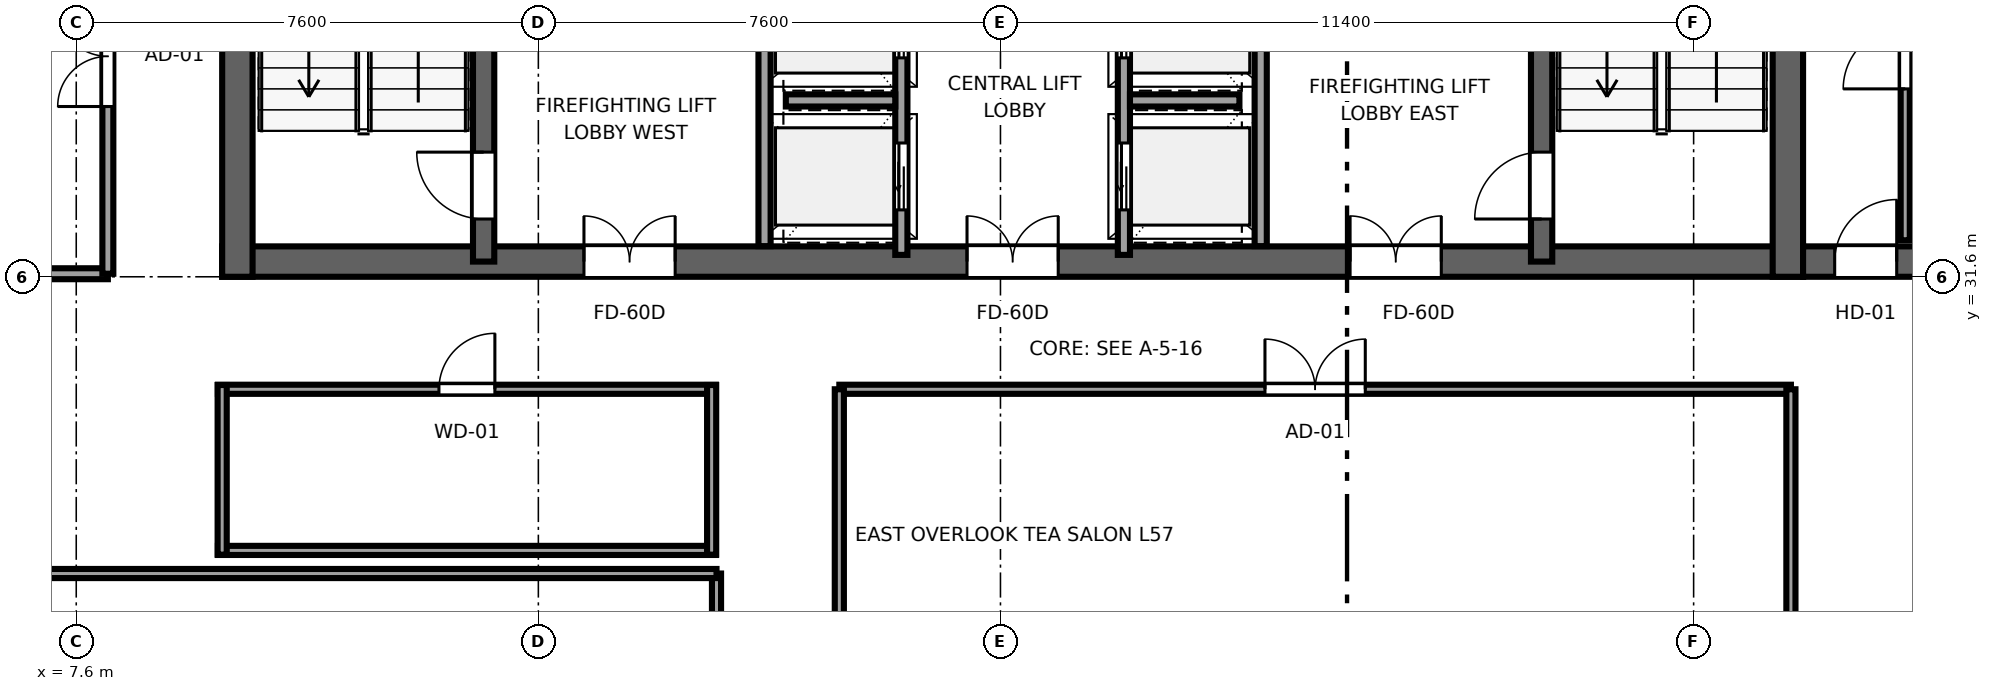
"""IFC4 building model, lengths in metres.
Left out: names, types, materials, properties, quantities, classifications, styles, units other than length and angle.
Written with IfcOpenShell. Run it as: python <this file> out.ifc"""

import sys

from ifc_helpers import new_model, si_unit, direction, frame, frame_2d, origin, place, context, subcontext, project, spatial, rectangle, extrude, source, transform, mapped, element, fill, save


model = new_model("IFC4")
c1 = context("Model", 3, precision=1e-05, world=origin(), true_north=direction((0.0, 1.0)))
c2 = subcontext(c1, "Body", "Model", "MODEL_VIEW")
j1 = project(units=[si_unit("LENGTHUNIT", "METRE"), si_unit("PLANEANGLEUNIT", "RADIAN")], contexts=[c1])
p1 = place(None, origin())
s1 = spatial("IfcSite", under=j1, at=p1, CompositionType="ELEMENT")
p2 = place(p1, origin())
s2 = spatial("IfcBuilding", under=s1, at=p2, CompositionType="ELEMENT")
p3 = place(p2, frame((0.0, 0.0, 216.8)))
s3 = spatial("IfcBuildingStorey", under=s2, at=p3, CompositionType="ELEMENT", Elevation=216.8)
p4 = place(p3, frame((10.0, 31.85, 0.0), z_axis=(0.0, 0.0, 1.0), x_axis=(1.0, 0.0, 0.0)))
e1 = element("IfcWall", 1, at=p4, inside=s3, PredefinedType="SHEAR", context=c2, shape_type="SweptSolid", body=[
    extrude(rectangle(XDim=26.0, YDim=0.5, at=frame_2d((13.0, 0.0))), origin(), (0.0, 0.0, 1.0), 3.55),
])
p5 = place(p4, frame((7.45, 0.0, 0.0), z_axis=(0.0, 0.0, 1.0), x_axis=(-1.0, 0.0, 0.0)))
e2 = element("IfcOpeningElement", 2, at=p5, cuts=e1, PredefinedType="OPENING", context=c2, shape_type="SweptSolid", body=[
    extrude(rectangle(XDim=1.5, YDim=2.04, at=frame_2d((0.75, 1.02))), frame((0.0, 0.26, 0.0), z_axis=(0.0, -1.0, 0.0), x_axis=(1.0, 0.0, 0.0)), (0.0, 0.0, 1.0), 0.52),
])
p6 = place(p4, frame((13.75, 0.0, 0.0), z_axis=(0.0, 0.0, 1.0), x_axis=(-1.0, 0.0, 0.0)))
e3 = element("IfcOpeningElement", 3, at=p6, cuts=e1, PredefinedType="OPENING", context=c2, shape_type="SweptSolid", body=[
    extrude(rectangle(XDim=1.5, YDim=2.04, at=frame_2d((0.75, 1.02))), frame((0.0, 0.26, 0.0), z_axis=(0.0, -1.0, 0.0), x_axis=(1.0, 0.0, 0.0)), (0.0, 0.0, 1.0), 0.52),
])
p7 = place(p4, frame((20.05, 0.0, 0.0), z_axis=(0.0, 0.0, 1.0), x_axis=(-1.0, 0.0, 0.0)))
e4 = element("IfcOpeningElement", 4, at=p7, cuts=e1, PredefinedType="OPENING", context=c2, shape_type="SweptSolid", body=[
    extrude(rectangle(XDim=1.5, YDim=2.04, at=frame_2d((0.75, 1.02))), frame((0.0, 0.26, 0.0), z_axis=(0.0, -1.0, 0.0), x_axis=(1.0, 0.0, 0.0)), (0.0, 0.0, 1.0), 0.52),
])
for number, where, z_axis, x_axis in (
    (5, (10.25, 31.6, 0.0), (0.0, 0.0, 1.0), (0.0, 1.0, 0.0)),
    (6, (35.75, 31.6, 0.0), (0.0, 0.0, 1.0), (0.0, 1.0, 0.0)),
):
    element("IfcWall", number, at=place(p3, frame(where, z_axis=z_axis, x_axis=x_axis)), inside=s3, PredefinedType="SHEAR", context=c2, shape_type="SweptSolid", body=[
        extrude(rectangle(XDim=13.6, YDim=0.5, at=frame_2d((6.8, 0.0))), origin(), (0.0, 0.0, 1.0), 3.55),
    ])
p8 = place(p3, frame((14.3, 31.85, 0.0), z_axis=(0.0, 0.0, 1.0), x_axis=(0.0, 1.0, 0.0)))
e7 = element("IfcWall", 7, at=p8, inside=s3, PredefinedType="SHEAR", context=c2, shape_type="SweptSolid", body=[
    extrude(rectangle(XDim=13.1, YDim=0.35, at=frame_2d((6.55, 0.0))), origin(), (0.0, 0.0, 1.0), 3.55),
])
p9 = place(p8, frame((0.7, 0.0, 0.0)))
e8 = element("IfcOpeningElement", 8, at=p9, cuts=e7, PredefinedType="OPENING", context=c2, shape_type="SweptSolid", body=[
    extrude(rectangle(XDim=1.1, YDim=2.12, at=frame_2d((0.55, 1.06))), frame((0.0, 0.185, 0.0), z_axis=(0.0, -1.0, 0.0), x_axis=(1.0, 0.0, 0.0)), (0.0, 0.0, 1.0), 0.37),
])
p10 = place(p3, frame((31.7, 31.85, 0.0), z_axis=(0.0, 0.0, 1.0), x_axis=(0.0, 1.0, 0.0)))
e9 = element("IfcWall", 9, at=p10, inside=s3, PredefinedType="SHEAR", context=c2, shape_type="SweptSolid", body=[
    extrude(rectangle(XDim=13.1, YDim=0.35, at=frame_2d((6.55, 0.0))), origin(), (0.0, 0.0, 1.0), 3.55),
])
p11 = place(p10, frame((1.8, 0.0, 0.0), z_axis=(0.0, 0.0, 1.0), x_axis=(-1.0, 0.0, 0.0)))
e10 = element("IfcOpeningElement", 10, at=p11, cuts=e9, PredefinedType="OPENING", context=c2, shape_type="SweptSolid", body=[
    extrude(rectangle(XDim=1.1, YDim=2.12, at=frame_2d((0.55, 1.06))), frame((0.0, 0.185, 0.0), z_axis=(0.0, -1.0, 0.0), x_axis=(1.0, 0.0, 0.0)), (0.0, 0.0, 1.0), 0.37),
])
p12 = place(p3, frame((36.0, 31.85, 0.0), z_axis=(0.0, 0.0, 1.0), x_axis=(1.0, 0.0, 0.0)))
e11 = element("IfcWall", 11, at=p12, inside=s3, PredefinedType="SHEAR", context=c2, shape_type="SweptSolid", body=[
    extrude(rectangle(XDim=3.8, YDim=0.5, at=frame_2d((1.9, 0.0))), origin(), (0.0, 0.0, 1.0), 3.55),
])
p13 = place(p12, frame((1.54, 0.0, 0.0), z_axis=(0.0, 0.0, 1.0), x_axis=(-1.0, 0.0, 0.0)))
e12 = element("IfcOpeningElement", 12, at=p13, cuts=e11, PredefinedType="OPENING", context=c2, shape_type="SweptSolid", body=[
    extrude(rectangle(XDim=1.02, YDim=2.03, at=frame_2d((0.51, 1.015))), frame((0.0, 0.26, 0.0), z_axis=(0.0, -1.0, 0.0), x_axis=(1.0, 0.0, 0.0)), (0.0, 0.0, 1.0), 0.52),
])
for number, where, z_axis, x_axis in (
    (13, (18.92, 32.104, 0.0), (0.0, 0.0, 1.0), (0.0, 1.0, 0.0)),
    (14, (27.08, 32.104, 0.0), (0.0, 0.0, 1.0), (0.0, 1.0, 0.0)),
):
    element("IfcWall", number, at=place(p3, frame(where, z_axis=z_axis, x_axis=x_axis)), inside=s3, PredefinedType="SOLIDWALL", context=c2, shape_type="SweptSolid", body=[
        extrude(rectangle(XDim=4.046, YDim=0.2, at=frame_2d((2.023, 0.0))), origin(), (0.0, 0.0, 1.0), 3.37),
    ])
p14 = place(p3, frame((21.17, 31.96, 0.0), z_axis=(0.0, 0.0, 1.0), x_axis=(0.0, 1.0, 0.0)))
e15 = element("IfcWall", 15, at=p14, inside=s3, PredefinedType="SOLIDWALL", context=c2, shape_type="SweptSolid", body=[
    extrude(rectangle(XDim=5.08, YDim=0.2, at=frame_2d((2.54, 0.0))), origin(), (0.0, 0.0, 1.0), 3.37),
])
p15 = place(p14, frame((0.74, 0.0, 0.0)))
e16 = element("IfcOpeningElement", 16, at=p15, cuts=e15, PredefinedType="OPENING", context=c2, shape_type="SweptSolid", body=[
    extrude(rectangle(XDim=1.1, YDim=2.12, at=frame_2d((0.55, 1.06))), frame((0.0, 0.11, 0.0), z_axis=(0.0, -1.0, 0.0), x_axis=(1.0, 0.0, 0.0)), (0.0, 0.0, 1.0), 0.22),
])
p16 = place(p14, frame((3.24, 0.0, 0.0)))
e17 = element("IfcOpeningElement", 17, at=p16, cuts=e15, PredefinedType="OPENING", context=c2, shape_type="SweptSolid", body=[
    extrude(rectangle(XDim=1.1, YDim=2.12, at=frame_2d((0.55, 1.06))), frame((0.0, 0.11, 0.0), z_axis=(0.0, -1.0, 0.0), x_axis=(1.0, 0.0, 0.0)), (0.0, 0.0, 1.0), 0.22),
])
p17 = place(p3, frame((19.27, 34.5, 0.0), z_axis=(0.0, 0.0, 1.0), x_axis=(1.0, 0.0, 0.0)))
e18 = element("IfcWall", 18, at=p17, inside=s3, PredefinedType="SOLIDWALL", context=c2, shape_type="SweptSolid", body=[
    extrude(rectangle(XDim=1.8, YDim=0.2, at=frame_2d((0.9, 0.0))), origin(), (0.0, 0.0, 1.0), 3.37),
])
p18 = place(p3, frame((24.83, 31.96, 0.0), z_axis=(0.0, 0.0, 1.0), x_axis=(0.0, 1.0, 0.0)))
e19 = element("IfcWall", 19, at=p18, inside=s3, PredefinedType="SOLIDWALL", context=c2, shape_type="SweptSolid", body=[
    extrude(rectangle(XDim=5.08, YDim=0.2, at=frame_2d((2.54, 0.0))), origin(), (0.0, 0.0, 1.0), 3.37),
])
p19 = place(p18, frame((0.74, 0.0, 0.0)))
e20 = element("IfcOpeningElement", 20, at=p19, cuts=e19, PredefinedType="OPENING", context=c2, shape_type="SweptSolid", body=[
    extrude(rectangle(XDim=1.1, YDim=2.12, at=frame_2d((0.55, 1.06))), frame((0.0, 0.11, 0.0), z_axis=(0.0, -1.0, 0.0), x_axis=(1.0, 0.0, 0.0)), (0.0, 0.0, 1.0), 0.22),
])
p20 = place(p18, frame((3.24, 0.0, 0.0)))
e21 = element("IfcOpeningElement", 21, at=p20, cuts=e19, PredefinedType="OPENING", context=c2, shape_type="SweptSolid", body=[
    extrude(rectangle(XDim=1.1, YDim=2.12, at=frame_2d((0.55, 1.06))), frame((0.0, 0.11, 0.0), z_axis=(0.0, -1.0, 0.0), x_axis=(1.0, 0.0, 0.0)), (0.0, 0.0, 1.0), 0.22),
])
p21 = place(p3, frame((24.93, 34.5, 0.0), z_axis=(0.0, 0.0, 1.0), x_axis=(1.0, 0.0, 0.0)))
e22 = element("IfcWall", 22, at=p21, inside=s3, PredefinedType="SOLIDWALL", context=c2, shape_type="SweptSolid", body=[
    extrude(rectangle(XDim=1.8, YDim=0.2, at=frame_2d((0.9, 0.0))), origin(), (0.0, 0.0, 1.0), 3.37),
])
p22 = place(p3, frame((37.68, 32.2, 0.0), z_axis=(0.0, 0.0, 1.0), x_axis=(0.0, 1.0, 0.0)))
e23 = element("IfcWall", 23, at=p22, inside=s3, PredefinedType="PARTITIONING", context=c2, shape_type="SweptSolid", body=[
    extrude(rectangle(XDim=6.0, YDim=0.15, at=frame_2d((3.0, 0.0))), origin(), (0.0, 0.0, 1.0), 3.37),
])
p23 = place(p22, frame((2.49, 0.0, 0.0)))
e24 = element("IfcOpeningElement", 24, at=p23, cuts=e23, PredefinedType="OPENING", context=c2, shape_type="SweptSolid", body=[
    extrude(rectangle(XDim=1.02, YDim=2.03, at=frame_2d((0.51, 1.015))), frame((0.0, 0.085, 0.0), z_axis=(0.0, -1.0, 0.0), x_axis=(1.0, 0.0, 0.0)), (0.0, 0.0, 1.0), 0.17),
])
p24 = place(p3, frame((18.13, 23.613, 0.0), z_axis=(0.0, 0.0, 1.0), x_axis=(0.0, 1.0, 0.0)))
e25 = element("IfcWall", 25, at=p24, inside=s3, PredefinedType="PARTITIONING", context=c2, shape_type="SweptSolid", body=[
    extrude(rectangle(XDim=3.107, YDim=0.15, at=frame_2d((1.553, 0.0))), origin(), (0.0, 0.0, 1.0), 3.37),
])
p25 = place(p24, frame((0.924, 0.0, 0.0)))
e26 = element("IfcOpeningElement", 26, at=p25, cuts=e25, PredefinedType="OPENING", context=c2, shape_type="SweptSolid", body=[
    extrude(rectangle(XDim=1.22, YDim=2.08, at=frame_2d((0.61, 1.04))), frame((0.0, 0.085, 0.0), z_axis=(0.0, -1.0, 0.0), x_axis=(1.0, 0.0, 0.0)), (0.0, 0.0, 1.0), 0.17),
])
p26 = place(p3, frame((3.005, 26.72, 0.0), z_axis=(0.0, 0.0, 1.0), x_axis=(1.0, 0.0, 0.0)))
e27 = element("IfcWall", 27, at=p26, inside=s3, PredefinedType="PARTITIONING", context=c2, shape_type="SweptSolid", body=[
    extrude(rectangle(XDim=15.125, YDim=0.15, at=frame_2d((7.562, 0.0))), origin(), (0.0, 0.0, 1.0), 3.37),
])
p27 = place(p3, frame((3.005, 31.65, 0.0), z_axis=(0.0, 0.0, 1.0), x_axis=(1.0, 0.0, 0.0)))
e28 = element("IfcWall", 28, at=p27, inside=s3, PredefinedType="PARTITIONING", context=c2, shape_type="SweptSolid", body=[
    extrude(rectangle(XDim=5.115, YDim=0.18, at=frame_2d((2.558, 0.0))), origin(), (0.0, 0.0, 1.0), 3.37),
])
p28 = place(p3, frame((8.12, 31.65, 0.0), z_axis=(0.0, 0.0, 1.0), x_axis=(0.0, 1.0, 0.0)))
e29 = element("IfcWall", 29, at=p28, inside=s3, PredefinedType="PARTITIONING", context=c2, shape_type="SweptSolid", body=[
    extrude(rectangle(XDim=6.55, YDim=0.18, at=frame_2d((3.275, 0.0))), origin(), (0.0, 0.0, 1.0), 3.37),
])
p29 = place(p28, frame((2.75, 0.0, 0.0)))
e30 = element("IfcOpeningElement", 30, at=p29, cuts=e29, PredefinedType="OPENING", context=c2, shape_type="SweptSolid", body=[
    extrude(rectangle(XDim=1.65, YDim=2.15, at=frame_2d((0.825, 1.075))), frame((0.0, 0.1, 0.0), z_axis=(0.0, -1.0, 0.0), x_axis=(1.0, 0.0, 0.0)), (0.0, 0.0, 1.0), 0.2),
])
p30 = place(p3, frame((9.93, 27.1, 0.0), z_axis=(0.0, 0.0, 1.0), x_axis=(1.0, 0.0, 0.0)))
e31 = element("IfcWall", 31, at=p30, inside=s3, PredefinedType="PARTITIONING", context=c2, shape_type="SweptSolid", body=[
    extrude(rectangle(XDim=8.19, YDim=0.15, at=frame_2d((4.095, 0.0))), origin(), (0.0, 0.0, 1.0), 3.37),
])
p31 = place(p3, frame((9.93, 29.75, 0.0), z_axis=(0.0, 0.0, 1.0), x_axis=(1.0, 0.0, 0.0)))
e32 = element("IfcWall", 32, at=p31, inside=s3, PredefinedType="PARTITIONING", context=c2, shape_type="SweptSolid", body=[
    extrude(rectangle(XDim=8.19, YDim=0.15, at=frame_2d((4.095, 0.0))), origin(), (0.0, 0.0, 1.0), 3.37),
])
p32 = place(p31, frame((3.635, 0.0, 0.0)))
e33 = element("IfcOpeningElement", 33, at=p32, cuts=e32, PredefinedType="OPENING", context=c2, shape_type="SweptSolid", body=[
    extrude(rectangle(XDim=0.92, YDim=2.01, at=frame_2d((0.46, 1.005))), frame((0.0, 0.085, 0.0), z_axis=(0.0, -1.0, 0.0), x_axis=(1.0, 0.0, 0.0)), (0.0, 0.0, 1.0), 0.17),
])
for number, where, z_axis, x_axis in (
    (34, (10.0, 27.03, 0.0), (0.0, 0.0, 1.0), (0.0, 1.0, 0.0)),
    (35, (18.05, 27.03, 0.0), (0.0, 0.0, 1.0), (0.0, 1.0, 0.0)),
):
    element("IfcWall", number, at=place(p3, frame(where, z_axis=z_axis, x_axis=x_axis)), inside=s3, PredefinedType="PARTITIONING", context=c2, shape_type="SweptSolid", body=[
        extrude(rectangle(XDim=2.79, YDim=0.15, at=frame_2d((1.395, 0.0))), origin(), (0.0, 0.0, 1.0), 3.37),
    ])
p33 = place(p3, frame((20.15, 29.75, 0.0), z_axis=(0.0, 0.0, 1.0), x_axis=(1.0, 0.0, 0.0)))
e36 = element("IfcWall", 36, at=p33, inside=s3, PredefinedType="PARTITIONING", context=c2, shape_type="SweptSolid", body=[
    extrude(rectangle(XDim=15.65, YDim=0.15, at=frame_2d((7.825, 0.0))), origin(), (0.0, 0.0, 1.0), 3.37),
])
p34 = place(p33, frame((7.0, 0.0, 0.0)))
e37 = element("IfcOpeningElement", 37, at=p34, cuts=e36, PredefinedType="OPENING", context=c2, shape_type="SweptSolid", body=[
    extrude(rectangle(XDim=1.65, YDim=2.15, at=frame_2d((0.825, 1.075))), frame((0.0, 0.085, 0.0), z_axis=(0.0, -1.0, 0.0), x_axis=(1.0, 0.0, 0.0)), (0.0, 0.0, 1.0), 0.17),
])
for number, where, z_axis, x_axis in (
    (38, (20.15, 25.0, 0.0), (0.0, 0.0, 1.0), (0.0, 1.0, 0.0)),
    (39, (35.8, 25.0, 0.0), (0.0, 0.0, 1.0), (0.0, 1.0, 0.0)),
):
    element("IfcWall", number, at=place(p3, frame(where, z_axis=z_axis, x_axis=x_axis)), inside=s3, PredefinedType="PARTITIONING", context=c2, shape_type="SweptSolid", body=[
        extrude(rectangle(XDim=4.75, YDim=0.15, at=frame_2d((2.375, 0.0))), origin(), (0.0, 0.0, 1.0), 3.37),
    ])
m1 = source(origin(), c2, "Body", "SweptSolid", [
    extrude(rectangle(XDim=1.1, YDim=2.12, at=frame_2d((0.55, 1.06))), frame((0.0, 0.025, 0.0), z_axis=(0.0, -1.0, 0.0), x_axis=(1.0, 0.0, 0.0)), (0.0, 0.0, 1.0), 0.05),
])
p35 = place(p9, origin())
e40 = element("IfcDoor", 40, at=p35, inside=s3, OperationType="SINGLE_SWING_RIGHT", PredefinedType="DOOR", context=c2, shape_type="MappedRepresentation", body=[
    mapped(m1, transform((0.0, 0.0, 0.0), x_axis=(1.0, 0.0, 0.0), y_axis=(0.0, 1.0, 0.0), z_axis=(0.0, 0.0, 1.0), scale=1.0)),
])
fill(e8, e40)
p36 = place(p11, origin())
e41 = element("IfcDoor", 41, at=p36, inside=s3, OperationType="SINGLE_SWING_LEFT", PredefinedType="DOOR", context=c2, shape_type="MappedRepresentation", body=[
    mapped(m1, transform((0.0, 0.0, 0.0), x_axis=(1.0, 0.0, 0.0), y_axis=(0.0, 1.0, 0.0), z_axis=(0.0, 0.0, 1.0), scale=1.0)),
])
fill(e10, e41)
m2 = source(origin(), c2, "Body", "SweptSolid", [
    extrude(rectangle(XDim=1.5, YDim=2.04, at=frame_2d((0.75, 1.02))), frame((0.0, 0.025, 0.0), z_axis=(0.0, -1.0, 0.0), x_axis=(1.0, 0.0, 0.0)), (0.0, 0.0, 1.0), 0.05),
])
p37 = place(p5, origin())
e42 = element("IfcDoor", 42, at=p37, inside=s3, OperationType="DOUBLE_DOOR_SINGLE_SWING", PredefinedType="DOOR", context=c2, shape_type="MappedRepresentation", body=[
    mapped(m2, transform((0.0, 0.0, 0.0), x_axis=(1.0, 0.0, 0.0), y_axis=(0.0, 1.0, 0.0), z_axis=(0.0, 0.0, 1.0), scale=1.0)),
])
fill(e2, e42)
p38 = place(p6, origin())
e43 = element("IfcDoor", 43, at=p38, inside=s3, OperationType="DOUBLE_DOOR_SINGLE_SWING", PredefinedType="DOOR", context=c2, shape_type="MappedRepresentation", body=[
    mapped(m2, transform((0.0, 0.0, 0.0), x_axis=(1.0, 0.0, 0.0), y_axis=(0.0, 1.0, 0.0), z_axis=(0.0, 0.0, 1.0), scale=1.0)),
])
fill(e3, e43)
p39 = place(p7, origin())
e44 = element("IfcDoor", 44, at=p39, inside=s3, OperationType="DOUBLE_DOOR_SINGLE_SWING", PredefinedType="DOOR", context=c2, shape_type="MappedRepresentation", body=[
    mapped(m2, transform((0.0, 0.0, 0.0), x_axis=(1.0, 0.0, 0.0), y_axis=(0.0, 1.0, 0.0), z_axis=(0.0, 0.0, 1.0), scale=1.0)),
])
fill(e4, e44)
m3 = source(origin(), c2, "Body", "SweptSolid", [
    extrude(rectangle(XDim=1.02, YDim=2.03, at=frame_2d((0.51, 1.015))), frame((0.0, 0.025, 0.0), z_axis=(0.0, -1.0, 0.0), x_axis=(1.0, 0.0, 0.0)), (0.0, 0.0, 1.0), 0.05),
])
p40 = place(p13, origin())
e45 = element("IfcDoor", 45, at=p40, inside=s3, OperationType="SINGLE_SWING_RIGHT", PredefinedType="DOOR", context=c2, shape_type="MappedRepresentation", body=[
    mapped(m3, transform((0.0, 0.0, 0.0), x_axis=(1.0, 0.0, 0.0), y_axis=(0.0, 1.0, 0.0), z_axis=(0.0, 0.0, 1.0), scale=1.0)),
])
fill(e12, e45)
m4 = source(origin(), c2, "Body", "SweptSolid", [
    extrude(rectangle(XDim=1.1, YDim=2.12, at=frame_2d((0.55, 1.06))), frame((0.0, 0.025, 0.0), z_axis=(0.0, -1.0, 0.0), x_axis=(1.0, 0.0, 0.0)), (0.0, 0.0, 1.0), 0.05),
])
p41 = place(p15, origin())
e46 = element("IfcDoor", 46, at=p41, inside=s3, OperationType="SLIDING_TO_LEFT", PredefinedType="DOOR", context=c2, shape_type="MappedRepresentation", body=[
    mapped(m4, transform((0.0, 0.0, 0.0), x_axis=(1.0, 0.0, 0.0), y_axis=(0.0, 1.0, 0.0), z_axis=(0.0, 0.0, 1.0), scale=1.0)),
])
fill(e16, e46)
p42 = place(p16, origin())
e47 = element("IfcDoor", 47, at=p42, inside=s3, OperationType="SLIDING_TO_RIGHT", PredefinedType="DOOR", context=c2, shape_type="MappedRepresentation", body=[
    mapped(m4, transform((0.0, 0.0, 0.0), x_axis=(1.0, 0.0, 0.0), y_axis=(0.0, 1.0, 0.0), z_axis=(0.0, 0.0, 1.0), scale=1.0)),
])
fill(e17, e47)
p43 = place(p19, origin())
e48 = element("IfcDoor", 48, at=p43, inside=s3, OperationType="SLIDING_TO_LEFT", PredefinedType="DOOR", context=c2, shape_type="MappedRepresentation", body=[
    mapped(m4, transform((0.0, 0.0, 0.0), x_axis=(1.0, 0.0, 0.0), y_axis=(0.0, 1.0, 0.0), z_axis=(0.0, 0.0, 1.0), scale=1.0)),
])
fill(e20, e48)
p44 = place(p20, origin())
e49 = element("IfcDoor", 49, at=p44, inside=s3, OperationType="SLIDING_TO_RIGHT", PredefinedType="DOOR", context=c2, shape_type="MappedRepresentation", body=[
    mapped(m4, transform((0.0, 0.0, 0.0), x_axis=(1.0, 0.0, 0.0), y_axis=(0.0, 1.0, 0.0), z_axis=(0.0, 0.0, 1.0), scale=1.0)),
])
fill(e21, e49)
p45 = place(p23, origin())
e50 = element("IfcDoor", 50, at=p45, inside=s3, OperationType="SINGLE_SWING_LEFT", PredefinedType="DOOR", context=c2, shape_type="MappedRepresentation", body=[
    mapped(m3, transform((0.0, 0.0, 0.0), x_axis=(1.0, 0.0, 0.0), y_axis=(0.0, 1.0, 0.0), z_axis=(0.0, 0.0, 1.0), scale=1.0)),
])
fill(e24, e50)
m5 = source(origin(), c2, "Body", "SweptSolid", [
    extrude(rectangle(XDim=1.65, YDim=2.15, at=frame_2d((0.825, 1.075))), frame((0.0, 0.025, 0.0), z_axis=(0.0, -1.0, 0.0), x_axis=(1.0, 0.0, 0.0)), (0.0, 0.0, 1.0), 0.05),
])
p46 = place(p29, origin())
e51 = element("IfcDoor", 51, at=p46, inside=s3, OperationType="DOUBLE_DOOR_SINGLE_SWING", PredefinedType="DOOR", context=c2, shape_type="MappedRepresentation", body=[
    mapped(m5, transform((0.0, 0.0, 0.0), x_axis=(1.0, 0.0, 0.0), y_axis=(0.0, 1.0, 0.0), z_axis=(0.0, 0.0, 1.0), scale=1.0)),
])
fill(e30, e51)
m6 = source(origin(), c2, "Body", "SweptSolid", [
    extrude(rectangle(XDim=0.92, YDim=2.01, at=frame_2d((0.46, 1.005))), frame((0.0, 0.025, 0.0), z_axis=(0.0, -1.0, 0.0), x_axis=(1.0, 0.0, 0.0)), (0.0, 0.0, 1.0), 0.05),
])
p47 = place(p32, origin())
e52 = element("IfcDoor", 52, at=p47, inside=s3, OperationType="SINGLE_SWING_RIGHT", PredefinedType="DOOR", context=c2, shape_type="MappedRepresentation", body=[
    mapped(m6, transform((0.0, 0.0, 0.0), x_axis=(1.0, 0.0, 0.0), y_axis=(0.0, 1.0, 0.0), z_axis=(0.0, 0.0, 1.0), scale=1.0)),
])
fill(e33, e52)
p48 = place(p34, origin())
e53 = element("IfcDoor", 53, at=p48, inside=s3, OperationType="DOUBLE_DOOR_SINGLE_SWING", PredefinedType="DOOR", context=c2, shape_type="MappedRepresentation", body=[
    mapped(m5, transform((0.0, 0.0, 0.0), x_axis=(1.0, 0.0, 0.0), y_axis=(0.0, 1.0, 0.0), z_axis=(0.0, 0.0, 1.0), scale=1.0)),
])
fill(e37, e53)
save(model, sys.argv[1])
